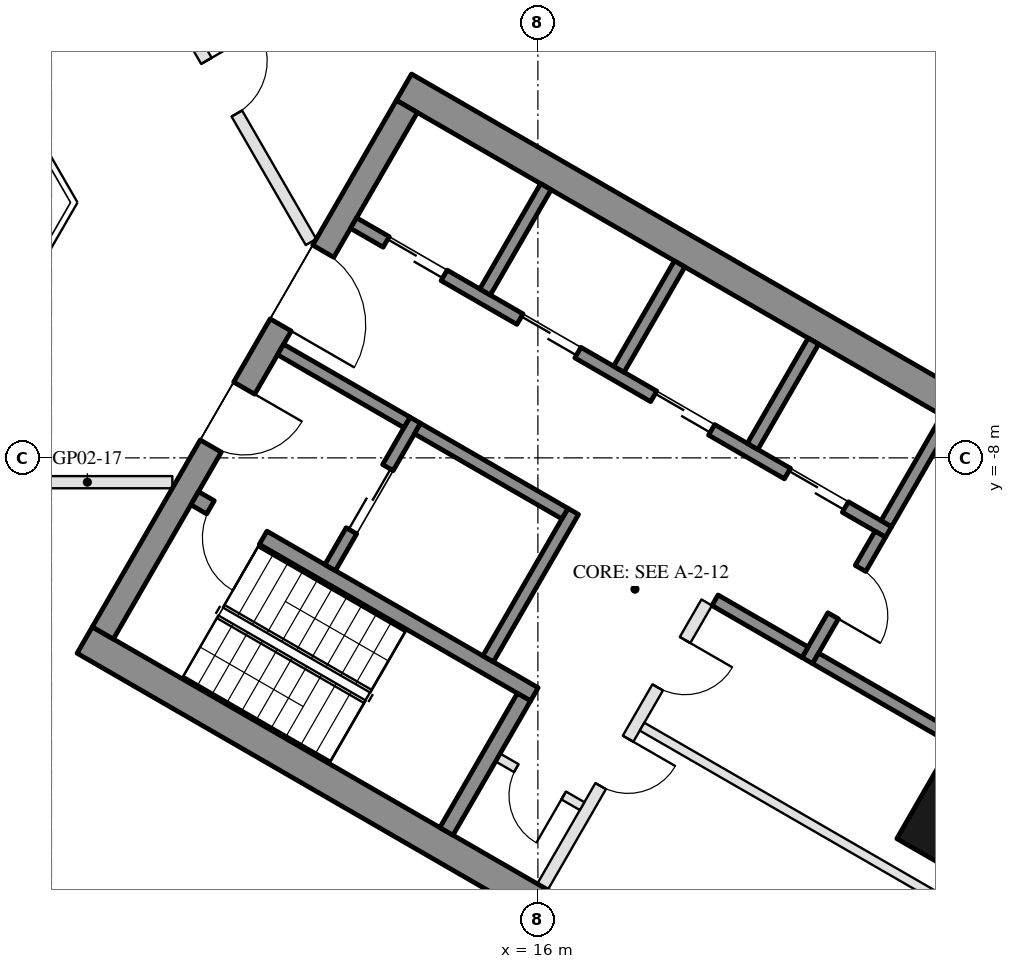
"""IFC4 building model, lengths in metres.
Left out: names, types, materials, properties, quantities, classifications, styles, units other than length and angle.
Written with IfcOpenShell. Run it as: python <this file> out.ifc"""

import sys

from ifc_helpers import new_model, si_unit, direction, frame, frame_2d, origin, origin_2d, place, context, subcontext, project, spatial, rectangle, hollow_rectangle, extrude, element, fill, save


model = new_model("IFC4")
c1 = context("Model", 3, precision=1e-05, world=origin(), true_north=direction((0.0, 1.0)))
c2 = subcontext(c1, "Body", "Model", "MODEL_VIEW")
j1 = project(units=[si_unit("LENGTHUNIT", "METRE"), si_unit("PLANEANGLEUNIT", "RADIAN")], contexts=[c1])
p1 = place(None, origin())
s1 = spatial("IfcSite", under=j1, at=p1, CompositionType="ELEMENT")
p2 = place(p1, origin())
s2 = spatial("IfcBuilding", under=s1, at=p2, CompositionType="ELEMENT")
p3 = place(p2, frame((0.0, 0.0, 57.6)))
s3 = spatial("IfcBuildingStorey", under=s2, at=p3, CompositionType="ELEMENT", Elevation=57.6)
p4 = place(p3, frame((23.643, -13.65, 0.0), z_axis=(0.0, 0.0, 1.0), x_axis=(0.5, 0.866025403784, 0.0)))
e1 = element("IfcColumn", 1, at=p4, inside=s3, PredefinedType="COLUMN", context=c2, shape_type="SweptSolid", body=[
    extrude(hollow_rectangle(XDim=2.8, YDim=2.4, WallThickness=0.07, at=origin_2d()), origin(), (0.0, 0.0, 1.0), 3.7),
])
p5 = place(p3, frame((26.257, -6.567, 0.0), z_axis=(0.0, 0.0, 1.0), x_axis=(-0.500023526245, 0.866011820475, 0.0)))
e2 = element("IfcWall", 2, at=p5, inside=s3, PredefinedType="SOLIDWALL", context=c2, shape_type="SweptSolid", body=[
    extrude(rectangle(XDim=11.816, YDim=0.35, at=frame_2d((5.908, 0.0))), origin(), (0.0, 0.0, 1.0), 3.55),
])
p6 = place(p5, frame((0.38, 0.0, 0.3)))
e3 = element("IfcOpeningElement", 3, at=p6, cuts=e2, PredefinedType="OPENING", context=c2, shape_type="SweptSolid", body=[
    extrude(rectangle(XDim=1.7, YDim=2.65, at=frame_2d((0.85, 1.325))), frame((0.0, 0.185, 0.0), z_axis=(0.0, -1.0, 0.0), x_axis=(1.0, 0.0, 0.0)), (0.0, 0.0, 1.0), 0.37),
])
p7 = place(p5, frame((7.666, 0.0, 0.0)))
e4 = element("IfcOpeningElement", 4, at=p7, cuts=e2, PredefinedType="OPENING", context=c2, shape_type="SweptSolid", body=[
    extrude(rectangle(XDim=2.4, YDim=2.4, at=frame_2d((1.2, 1.2))), frame((0.0, 0.185, 0.0), z_axis=(0.0, -1.0, 0.0), x_axis=(1.0, 0.0, 0.0)), (0.0, 0.0, 1.0), 0.37),
])
p8 = place(p5, frame((3.865, 0.0, 0.3)))
e5 = element("IfcOpeningElement", 5, at=p8, cuts=e2, PredefinedType="OPENING", context=c2, shape_type="SweptSolid", body=[
    extrude(rectangle(XDim=1.6, YDim=2.65, at=frame_2d((0.8, 1.325))), frame((0.0, 0.185, 0.0), z_axis=(0.0, -1.0, 0.0), x_axis=(1.0, 0.0, 0.0)), (0.0, 0.0, 1.0), 0.37),
])
p9 = place(p5, frame((5.765, 0.0, 0.3)))
e6 = element("IfcOpeningElement", 6, at=p9, cuts=e2, PredefinedType="OPENING", context=c2, shape_type="SweptSolid", body=[
    extrude(rectangle(XDim=1.6, YDim=2.65, at=frame_2d((0.8, 1.325))), frame((0.0, 0.185, 0.0), z_axis=(0.0, -1.0, 0.0), x_axis=(1.0, 0.0, 0.0)), (0.0, 0.0, 1.0), 0.37),
])
for number, where, z_axis, x_axis in (
    (7, (8.547, -10.997, 0.0), (0.0, 0.0, 1.0), (0.866, -0.5, 0.0)),
    (8, (13.797, -1.903, 0.0), (0.0, 0.0, 1.0), (0.866, -0.5, 0.0)),
):
    element("IfcWall", number, at=place(p3, frame(where, z_axis=z_axis, x_axis=x_axis)), inside=s3, PredefinedType="SHEAR", context=c2, shape_type="SweptSolid", body=[
        extrude(rectangle(XDim=14.837, YDim=0.5, at=frame_2d((7.418, 0.0))), origin(), (0.0, 0.0, 1.0), 3.5),
    ])
p10 = place(p3, frame((8.845, -10.88, 0.0), z_axis=(0.0, 0.0, 1.0), x_axis=(0.500004234368, 0.866022959057, 0.0)))
e9 = element("IfcWall", 9, at=p10, inside=s3, PredefinedType="SHEAR", context=c2, shape_type="SweptSolid", body=[
    extrude(rectangle(XDim=10.0, YDim=0.4, at=frame_2d((5.0, 0.0))), origin(), (0.0, 0.0, 1.0), 3.5),
])
p11 = place(p10, frame((3.55, 0.0, 0.0)))
e10 = element("IfcOpeningElement", 10, at=p11, cuts=e9, PredefinedType="OPENING", context=c2, shape_type="SweptSolid", body=[
    extrude(rectangle(XDim=1.1, YDim=2.1, at=frame_2d((0.55, 1.05))), frame((0.0, 0.21, 0.0), z_axis=(0.0, -1.0, 0.0), x_axis=(1.0, 0.0, 0.0)), (0.0, 0.0, 1.0), 0.42),
])
p12 = place(p10, frame((5.85, 0.0, 0.0)))
e11 = element("IfcOpeningElement", 11, at=p12, cuts=e9, PredefinedType="OPENING", context=c2, shape_type="SweptSolid", body=[
    extrude(rectangle(XDim=1.4, YDim=2.1, at=frame_2d((0.7, 1.05))), frame((0.0, 0.21, 0.0), z_axis=(0.0, -1.0, 0.0), x_axis=(1.0, 0.0, 0.0)), (0.0, 0.0, 1.0), 0.42),
])
p13 = place(p3, frame((10.356, -8.664, 0.0), z_axis=(0.0, 0.0, 1.0), x_axis=(0.866028629588, -0.499994412703, 0.0)))
e12 = element("IfcWall", 12, at=p13, inside=s3, PredefinedType="SHEAR", context=c2, shape_type="SweptSolid", body=[
    extrude(rectangle(XDim=6.45, YDim=0.25, at=frame_2d((3.225, 0.0))), origin(), (0.0, 0.0, 1.0), 3.5),
])
p14 = place(p13, frame((0.3, 0.0, 0.0)))
e13 = element("IfcOpeningElement", 13, at=p14, cuts=e12, PredefinedType="OPENING", context=c2, shape_type="SweptSolid", body=[
    extrude(rectangle(XDim=1.0, YDim=2.1, at=frame_2d((0.5, 1.05))), frame((0.0, 0.135, 0.0), z_axis=(0.0, -1.0, 0.0), x_axis=(1.0, 0.0, 0.0)), (0.0, 0.0, 1.0), 0.27),
])
p15 = place(p3, frame((14.496, -14.143, 0.0), z_axis=(0.0, 0.0, 1.0), x_axis=(0.500062241894, 0.865989465428, 0.0)))
e14 = element("IfcWall", 14, at=p15, inside=s3, PredefinedType="SHEAR", context=c2, shape_type="SweptSolid", body=[
    extrude(rectangle(XDim=2.55, YDim=0.25, at=frame_2d((1.275, 0.0))), origin(), (0.0, 0.0, 1.0), 3.5),
])
p16 = place(p3, frame((15.181, -11.305, 0.0), z_axis=(0.0, 0.0, 1.0), x_axis=(0.49994636267, 0.866056369097, 0.0)))
e15 = element("IfcWall", 15, at=p16, inside=s3, PredefinedType="SHEAR", context=c2, shape_type="SweptSolid", body=[
    extrude(rectangle(XDim=2.8, YDim=0.2, at=frame_2d((1.4, 0.0))), origin(), (0.0, 0.0, 1.0), 3.5),
])
p17 = place(p3, frame((12.583, -9.805, 0.0), z_axis=(0.0, 0.0, 1.0), x_axis=(0.49994636267, 0.866056369097, 0.0)))
e16 = element("IfcWall", 16, at=p17, inside=s3, PredefinedType="SHEAR", context=c2, shape_type="SweptSolid", body=[
    extrude(rectangle(XDim=2.8, YDim=0.2, at=frame_2d((1.4, 0.0))), origin(), (0.0, 0.0, 1.0), 3.5),
])
p18 = place(p17, frame((0.7, 0.0, 0.0)))
e17 = element("IfcOpeningElement", 17, at=p18, cuts=e16, PredefinedType="OPENING", context=c2, shape_type="SweptSolid", body=[
    extrude(rectangle(XDim=1.2, YDim=2.1, at=frame_2d((0.6, 1.05))), frame((0.0, 0.11, 0.0), z_axis=(0.0, -1.0, 0.0), x_axis=(1.0, 0.0, 0.0)), (0.0, 0.0, 1.0), 0.22),
])
p19 = place(p3, frame((11.768, -6.217, 0.0), z_axis=(0.0, 0.0, 1.0), x_axis=(0.866050077142, -0.499957262057, 0.0)))
e18 = element("IfcWall", 18, at=p19, inside=s3, PredefinedType="SHEAR", context=c2, shape_type="SweptSolid", body=[
    extrude(rectangle(XDim=2.4, YDim=0.2, at=frame_2d((1.2, 0.0))), origin(), (0.0, 0.0, 1.0), 3.5),
])
p20 = place(p3, frame((14.02, -7.517, 0.0), z_axis=(0.0, 0.0, 1.0), x_axis=(0.866034573852, -0.49998411664, 0.0)))
e19 = element("IfcWall", 19, at=p20, inside=s3, PredefinedType="SHEAR", context=c2, shape_type="SweptSolid", body=[
    extrude(rectangle(XDim=2.8, YDim=0.2, at=frame_2d((1.4, 0.0))), origin(), (0.0, 0.0, 1.0), 3.5),
])
p21 = place(p3, frame((12.968, -4.138, 0.0), z_axis=(0.0, 0.0, 1.0), x_axis=(0.866028328073, -0.49999493495, 0.0)))
e20 = element("IfcWall", 20, at=p21, inside=s3, PredefinedType="SHEAR", context=c2, shape_type="SweptSolid", body=[
    extrude(rectangle(XDim=10.16, YDim=0.2, at=frame_2d((5.08, 0.0))), origin(), (0.0, 0.0, 1.0), 3.5),
])
p22 = place(p21, frame((0.62, 0.0, 0.0)))
e21 = element("IfcOpeningElement", 21, at=p22, cuts=e20, PredefinedType="OPENING", context=c2, shape_type="SweptSolid", body=[
    extrude(rectangle(XDim=1.1, YDim=2.1, at=frame_2d((0.55, 1.05))), frame((0.0, 0.11, 0.0), z_axis=(0.0, -1.0, 0.0), x_axis=(1.0, 0.0, 0.0)), (0.0, 0.0, 1.0), 0.22),
])
p23 = place(p21, frame((3.16, 0.0, 0.0)))
e22 = element("IfcOpeningElement", 22, at=p23, cuts=e20, PredefinedType="OPENING", context=c2, shape_type="SweptSolid", body=[
    extrude(rectangle(XDim=1.1, YDim=2.1, at=frame_2d((0.55, 1.05))), frame((0.0, 0.11, 0.0), z_axis=(0.0, -1.0, 0.0), x_axis=(1.0, 0.0, 0.0)), (0.0, 0.0, 1.0), 0.22),
])
p24 = place(p21, frame((5.7, 0.0, 0.0)))
e23 = element("IfcOpeningElement", 23, at=p24, cuts=e20, PredefinedType="OPENING", context=c2, shape_type="SweptSolid", body=[
    extrude(rectangle(XDim=1.1, YDim=2.1, at=frame_2d((0.55, 1.05))), frame((0.0, 0.11, 0.0), z_axis=(0.0, -1.0, 0.0), x_axis=(1.0, 0.0, 0.0)), (0.0, 0.0, 1.0), 0.22),
])
p25 = place(p21, frame((8.24, 0.0, 0.0)))
e24 = element("IfcOpeningElement", 24, at=p25, cuts=e20, PredefinedType="OPENING", context=c2, shape_type="SweptSolid", body=[
    extrude(rectangle(XDim=1.1, YDim=2.1, at=frame_2d((0.55, 1.05))), frame((0.0, 0.11, 0.0), z_axis=(0.0, -1.0, 0.0), x_axis=(1.0, 0.0, 0.0)), (0.0, 0.0, 1.0), 0.22),
])
p26 = place(p3, frame((20.43, -11.333, 0.0), z_axis=(0.0, 0.0, 1.0), x_axis=(0.500001309137, 0.866024647952, 0.0)))
e25 = element("IfcWall", 25, at=p26, inside=s3, PredefinedType="SHEAR", context=c2, shape_type="SweptSolid", body=[
    extrude(rectangle(XDim=2.4, YDim=0.2, at=frame_2d((1.2, 0.0))), origin(), (0.0, 0.0, 1.0), 3.5),
])
p27 = place(p26, frame((0.85, 0.0, 0.0)))
e26 = element("IfcOpeningElement", 26, at=p27, cuts=e25, PredefinedType="OPENING", context=c2, shape_type="SweptSolid", body=[
    extrude(rectangle(XDim=0.9, YDim=2.1, at=frame_2d((0.45, 1.05))), frame((0.0, 0.11, 0.0), z_axis=(0.0, -1.0, 0.0), x_axis=(1.0, 0.0, 0.0)), (0.0, 0.0, 1.0), 0.22),
])
p28 = place(p3, frame((18.913, -10.342, 0.0), z_axis=(0.0, 0.0, 1.0), x_axis=(0.866038183914, -0.499977863513, 0.0)))
e27 = element("IfcWall", 27, at=p28, inside=s3, PredefinedType="SHEAR", context=c2, shape_type="SweptSolid", body=[
    extrude(rectangle(XDim=1.71, YDim=0.2, at=frame_2d((0.855, 0.0))), origin(), (0.0, 0.0, 1.0), 3.5),
])
for number, where, z_axis, x_axis in (
    (28, (15.131, -5.272, 0.0), (0.0, 0.0, 1.0), (0.5, 0.866, 0.0)),
    (29, (17.331, -6.542, 0.0), (0.0, 0.0, 1.0), (0.5, 0.866, 0.0)),
    (30, (19.531, -7.812, 0.0), (0.0, 0.0, 1.0), (0.5, 0.866, 0.0)),
    (31, (21.73, -9.082, 0.0), (0.0, 0.0, 1.0), (0.5, 0.866, 0.0)),
):
    element("IfcWall", number, at=place(p3, frame(where, z_axis=z_axis, x_axis=x_axis)), inside=s3, PredefinedType="SHEAR", context=c2, shape_type="SweptSolid", body=[
        extrude(rectangle(XDim=2.0, YDim=0.2, at=frame_2d((1.0, 0.0))), origin(), (0.0, 0.0, 1.0), 3.5),
    ])
p29 = place(p3, frame((20.567, -11.297, 0.0), z_axis=(0.0, 0.0, 1.0), x_axis=(0.866060851709, -0.499938597367, 0.0)))
e32 = element("IfcWall", 32, at=p29, inside=s3, PredefinedType="SHEAR", context=c2, shape_type="SweptSolid", body=[
    extrude(rectangle(XDim=2.64, YDim=0.2, at=frame_2d((1.32, 0.0))), origin(), (0.0, 0.0, 1.0), 3.5),
])
p30 = place(p3, frame((16.076, -15.055, 0.0), z_axis=(0.0, 0.0, 1.0), x_axis=(0.499995103361, 0.866028230842, 0.0)))
e33 = element("IfcWall", 33, at=p30, inside=s3, PredefinedType="PARTITIONING", context=c2, shape_type="SweptSolid", body=[
    extrude(rectangle(XDim=5.4, YDim=0.2, at=frame_2d((2.7, 0.0))), origin(), (0.0, 0.0, 1.0), 3.5),
])
p31 = place(p30, frame((1.913, 0.0, 0.0)))
e34 = element("IfcOpeningElement", 34, at=p31, cuts=e33, PredefinedType="OPENING", context=c2, shape_type="SweptSolid", body=[
    extrude(rectangle(XDim=0.9, YDim=2.1, at=frame_2d((0.45, 1.05))), frame((0.0, 0.11, 0.0), z_axis=(0.0, -1.0, 0.0), x_axis=(1.0, 0.0, 0.0)), (0.0, 0.0, 1.0), 0.22),
])
p32 = place(p30, frame((3.788, 0.0, 0.0)))
e35 = element("IfcOpeningElement", 35, at=p32, cuts=e33, PredefinedType="OPENING", context=c2, shape_type="SweptSolid", body=[
    extrude(rectangle(XDim=0.9, YDim=2.1, at=frame_2d((0.45, 1.05))), frame((0.0, 0.11, 0.0), z_axis=(0.0, -1.0, 0.0), x_axis=(1.0, 0.0, 0.0)), (0.0, 0.0, 1.0), 0.22),
])
p33 = place(p3, frame((15.342, -12.928, 0.0), z_axis=(0.0, 0.0, 1.0), x_axis=(0.865989903783, -0.500061482766, 0.0)))
e36 = element("IfcWall", 36, at=p33, inside=s3, PredefinedType="PARTITIONING", context=c2, shape_type="SweptSolid", body=[
    extrude(rectangle(XDim=1.6, YDim=0.15, at=frame_2d((0.8, 0.0))), origin(), (0.0, 0.0, 1.0), 3.5),
])
p34 = place(p33, frame((0.35, 0.0, 0.0)))
e37 = element("IfcOpeningElement", 37, at=p34, cuts=e36, PredefinedType="OPENING", context=c2, shape_type="SweptSolid", body=[
    extrude(rectangle(XDim=0.9, YDim=2.1, at=frame_2d((0.45, 1.05))), frame((0.0, 0.085, 0.0), z_axis=(0.0, -1.0, 0.0), x_axis=(1.0, 0.0, 0.0)), (0.0, 0.0, 1.0), 0.17),
])
p35 = place(p3, frame((17.713, -12.42, 0.0), z_axis=(0.0, 0.0, 1.0), x_axis=(0.866016523273, -0.500015381182, 0.0)))
e38 = element("IfcWall", 38, at=p35, inside=s3, PredefinedType="PARTITIONING", context=c2, shape_type="SweptSolid", body=[
    extrude(rectangle(XDim=6.95, YDim=0.15, at=frame_2d((3.475, 0.0))), origin(), (0.0, 0.0, 1.0), 3.5),
])
p36 = place(p3, frame((9.988, -8.4, 0.0), z_axis=(0.0, 0.0, 1.0), x_axis=(-1.0, 0.0, 0.0)))
e39 = element("IfcWall", 39, at=p36, inside=s3, PredefinedType="PARTITIONING", context=c2, shape_type="SweptSolid", body=[
    extrude(rectangle(XDim=6.988, YDim=0.2, at=frame_2d((3.494, 0.0))), origin(), (0.0, 0.0, 1.0), 2.95),
])
p37 = place(p36, frame((2.994, 0.0, 0.0)))
e40 = element("IfcOpeningElement", 40, at=p37, cuts=e39, PredefinedType="OPENING", context=c2, shape_type="SweptSolid", body=[
    extrude(rectangle(XDim=1.0, YDim=2.1, at=frame_2d((0.5, 1.05))), frame((0.0, 0.11, 0.0), z_axis=(0.0, -1.0, 0.0), x_axis=(1.0, 0.0, 0.0)), (0.0, 0.0, 1.0), 0.22),
])
p38 = place(p3, frame((9.329, 0.643, 0.0), z_axis=(0.0, 0.0, 1.0), x_axis=(0.500001579811, -0.866024491678, 0.0)))
e41 = element("IfcWall", 41, at=p38, inside=s3, PredefinedType="PARTITIONING", context=c2, shape_type="SweptSolid", body=[
    extrude(rectangle(XDim=5.88, YDim=0.2, at=frame_2d((2.94, 0.0))), origin(), (0.0, 0.0, 1.0), 2.95),
])
p39 = place(p38, frame((2.44, 0.0, 0.0)))
e42 = element("IfcOpeningElement", 42, at=p39, cuts=e41, PredefinedType="OPENING", context=c2, shape_type="SweptSolid", body=[
    extrude(rectangle(XDim=1.0, YDim=2.1, at=frame_2d((0.5, 1.05))), frame((0.0, 0.11, 0.0), z_axis=(0.0, -1.0, 0.0), x_axis=(1.0, 0.0, 0.0)), (0.0, 0.0, 1.0), 0.22),
])
p40 = place(p18, origin())
e43 = element("IfcDoor", 43, at=p40, inside=s3, OperationType="DOUBLE_DOOR_SLIDING", PredefinedType="DOOR", context=c2, shape_type="SweptSolid", body=[
    extrude(rectangle(XDim=1.2, YDim=2.1, at=frame_2d((0.6, 1.05))), frame((0.0, 0.025, 0.0), z_axis=(0.0, -1.0, 0.0), x_axis=(1.0, 0.0, 0.0)), (0.0, 0.0, 1.0), 0.05),
])
fill(e17, e43)
p41 = place(p34, frame((0.9, 0.0, 0.0), z_axis=(0.0, 0.0, 1.0), x_axis=(-1.0, 0.0, 0.0)))
e44 = element("IfcDoor", 44, at=p41, inside=s3, OperationType="SINGLE_SWING_LEFT", PredefinedType="DOOR", context=c2, shape_type="SweptSolid", body=[
    extrude(rectangle(XDim=0.9, YDim=2.1, at=frame_2d((0.45, 1.05))), frame((0.0, 0.025, 0.0), z_axis=(0.0, -1.0, 0.0), x_axis=(1.0, 0.0, 0.0)), (0.0, 0.0, 1.0), 0.05),
])
fill(e37, e44)
p42 = place(p22, origin())
e45 = element("IfcDoor", 45, at=p42, inside=s3, OperationType="DOUBLE_DOOR_SLIDING", PredefinedType="DOOR", context=c2, shape_type="SweptSolid", body=[
    extrude(rectangle(XDim=1.1, YDim=2.1, at=frame_2d((0.55, 1.05))), frame((0.0, 0.025, 0.0), z_axis=(0.0, -1.0, 0.0), x_axis=(1.0, 0.0, 0.0)), (0.0, 0.0, 1.0), 0.05),
])
fill(e21, e45)
p43 = place(p23, origin())
e46 = element("IfcDoor", 46, at=p43, inside=s3, OperationType="DOUBLE_DOOR_SLIDING", PredefinedType="DOOR", context=c2, shape_type="SweptSolid", body=[
    extrude(rectangle(XDim=1.1, YDim=2.1, at=frame_2d((0.55, 1.05))), frame((0.0, 0.025, 0.0), z_axis=(0.0, -1.0, 0.0), x_axis=(1.0, 0.0, 0.0)), (0.0, 0.0, 1.0), 0.05),
])
fill(e22, e46)
p44 = place(p24, origin())
e47 = element("IfcDoor", 47, at=p44, inside=s3, OperationType="DOUBLE_DOOR_SLIDING", PredefinedType="DOOR", context=c2, shape_type="SweptSolid", body=[
    extrude(rectangle(XDim=1.1, YDim=2.1, at=frame_2d((0.55, 1.05))), frame((0.0, 0.025, 0.0), z_axis=(0.0, -1.0, 0.0), x_axis=(1.0, 0.0, 0.0)), (0.0, 0.0, 1.0), 0.05),
])
fill(e23, e47)
p45 = place(p25, origin())
e48 = element("IfcDoor", 48, at=p45, inside=s3, OperationType="DOUBLE_DOOR_SLIDING", PredefinedType="DOOR", context=c2, shape_type="SweptSolid", body=[
    extrude(rectangle(XDim=1.1, YDim=2.1, at=frame_2d((0.55, 1.05))), frame((0.0, 0.025, 0.0), z_axis=(0.0, -1.0, 0.0), x_axis=(1.0, 0.0, 0.0)), (0.0, 0.0, 1.0), 0.05),
])
fill(e24, e48)
p46 = place(p27, frame((0.9, 0.0, 0.0), z_axis=(0.0, 0.0, 1.0), x_axis=(-1.0, 0.0, 0.0)))
e49 = element("IfcDoor", 49, at=p46, inside=s3, OperationType="SINGLE_SWING_RIGHT", PredefinedType="DOOR", context=c2, shape_type="SweptSolid", body=[
    extrude(rectangle(XDim=0.9, YDim=2.1, at=frame_2d((0.45, 1.05))), frame((0.0, 0.025, 0.0), z_axis=(0.0, -1.0, 0.0), x_axis=(1.0, 0.0, 0.0)), (0.0, 0.0, 1.0), 0.05),
])
fill(e26, e49)
p47 = place(p31, frame((0.9, 0.0, 0.0), z_axis=(0.0, 0.0, 1.0), x_axis=(-1.0, 0.0, 0.0)))
e50 = element("IfcDoor", 50, at=p47, inside=s3, OperationType="SINGLE_SWING_LEFT", PredefinedType="DOOR", context=c2, shape_type="SweptSolid", body=[
    extrude(rectangle(XDim=0.9, YDim=2.1, at=frame_2d((0.45, 1.05))), frame((0.0, 0.025, 0.0), z_axis=(0.0, -1.0, 0.0), x_axis=(1.0, 0.0, 0.0)), (0.0, 0.0, 1.0), 0.05),
])
fill(e34, e50)
p48 = place(p32, frame((0.9, 0.0, 0.0), z_axis=(0.0, 0.0, 1.0), x_axis=(-1.0, 0.0, 0.0)))
e51 = element("IfcDoor", 51, at=p48, inside=s3, OperationType="SINGLE_SWING_LEFT", PredefinedType="DOOR", context=c2, shape_type="SweptSolid", body=[
    extrude(rectangle(XDim=0.9, YDim=2.1, at=frame_2d((0.45, 1.05))), frame((0.0, 0.025, 0.0), z_axis=(0.0, -1.0, 0.0), x_axis=(1.0, 0.0, 0.0)), (0.0, 0.0, 1.0), 0.05),
])
fill(e35, e51)
p49 = place(p11, frame((1.1, 0.0, 0.0), z_axis=(0.0, 0.0, 1.0), x_axis=(-1.0, 0.0, 0.0)))
e52 = element("IfcDoor", 52, at=p49, inside=s3, OperationType="SINGLE_SWING_LEFT", PredefinedType="DOOR", context=c2, shape_type="SweptSolid", body=[
    extrude(rectangle(XDim=1.1, YDim=2.1, at=frame_2d((0.55, 1.05))), frame((0.0, 0.025, 0.0), z_axis=(0.0, -1.0, 0.0), x_axis=(1.0, 0.0, 0.0)), (0.0, 0.0, 1.0), 0.05),
])
fill(e10, e52)
p50 = place(p12, frame((1.4, 0.0, 0.0), z_axis=(0.0, 0.0, 1.0), x_axis=(-1.0, 0.0, 0.0)))
e53 = element("IfcDoor", 53, at=p50, inside=s3, OperationType="DOUBLE_DOOR_SINGLE_SWING", PredefinedType="DOOR", context=c2, shape_type="SweptSolid", body=[
    extrude(rectangle(XDim=1.4, YDim=2.1, at=frame_2d((0.7, 1.05))), frame((0.0, 0.025, 0.0), z_axis=(0.0, -1.0, 0.0), x_axis=(1.0, 0.0, 0.0)), (0.0, 0.0, 1.0), 0.05),
])
fill(e11, e53)
p51 = place(p14, frame((1.0, 0.0, 0.0), z_axis=(0.0, 0.0, 1.0), x_axis=(-1.0, 0.0, 0.0)))
e54 = element("IfcDoor", 54, at=p51, inside=s3, OperationType="SINGLE_SWING_LEFT", PredefinedType="DOOR", context=c2, shape_type="SweptSolid", body=[
    extrude(rectangle(XDim=1.0, YDim=2.1, at=frame_2d((0.5, 1.05))), frame((0.0, 0.025, 0.0), z_axis=(0.0, -1.0, 0.0), x_axis=(1.0, 0.0, 0.0)), (0.0, 0.0, 1.0), 0.05),
])
fill(e13, e54)
p52 = place(p39, origin())
e55 = element("IfcDoor", 55, at=p52, inside=s3, OperationType="SINGLE_SWING_LEFT", PredefinedType="DOOR", context=c2, shape_type="SweptSolid", body=[
    extrude(rectangle(XDim=1.0, YDim=2.1, at=frame_2d((0.5, 1.05))), frame((0.0, 0.025, 0.0), z_axis=(0.0, -1.0, 0.0), x_axis=(1.0, 0.0, 0.0)), (0.0, 0.0, 1.0), 0.05),
])
fill(e42, e55)
save(model, sys.argv[1])
